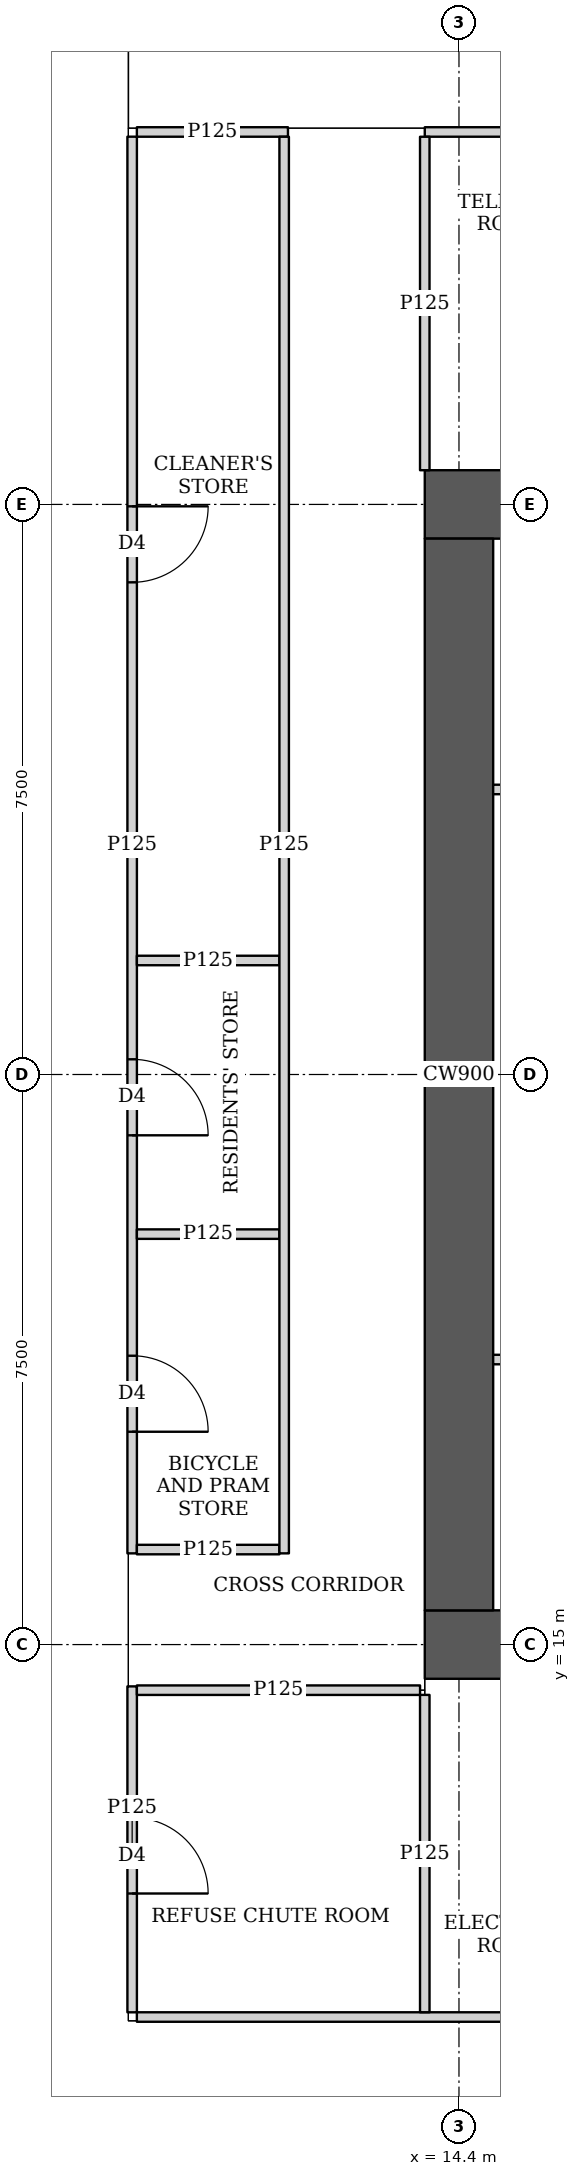
"""IFC4 building model, lengths in metres.
Left out: names, types, materials, properties, quantities, classifications, styles, units other than length and angle.
Written with IfcOpenShell. Run it as: python <this file> out.ifc"""

import sys

from ifc_helpers import new_model, si_unit, direction, frame, frame_2d, origin, place, context, subcontext, project, spatial, rectangle, extrude, element, fill, save


model = new_model("IFC4")
c1 = context("Model", 3, precision=1e-05, world=origin(), true_north=direction((0.0, 1.0)))
c2 = subcontext(c1, "Body", "Model", "MODEL_VIEW")
j1 = project(units=[si_unit("LENGTHUNIT", "METRE"), si_unit("PLANEANGLEUNIT", "RADIAN")], contexts=[c1])
p1 = place(None, origin())
s1 = spatial("IfcSite", under=j1, at=p1, CompositionType="ELEMENT")
p2 = place(p1, origin())
s2 = spatial("IfcBuilding", under=s1, at=p2, CompositionType="ELEMENT")
p3 = place(p2, frame((0.0, 0.0, 147.05)))
s3 = spatial("IfcBuildingStorey", under=s2, at=p3, CompositionType="ELEMENT", Elevation=147.05)
p4 = place(p3, frame((13.95, 15.0, 0.0), z_axis=(0.0, 0.0, 1.0), x_axis=(1.0, 0.0, 0.0)))
e1 = element("IfcWall", 1, at=p4, inside=s3, PredefinedType="SHEAR", context=c2, shape_type="SweptSolid", body=[
    extrude(rectangle(XDim=15.3, YDim=0.9, at=frame_2d((7.65, 0.0))), origin(), (0.0, 0.0, 1.0), 3.75),
])
p5 = place(p4, frame((4.45, 0.0, 0.0)))
e2 = element("IfcOpeningElement", 2, at=p5, cuts=e1, PredefinedType="OPENING", context=c2, shape_type="SweptSolid", body=[
    extrude(rectangle(XDim=1.8, YDim=2.1, at=frame_2d((0.9, 1.05))), frame((0.0, 0.46, 0.0), z_axis=(0.0, -1.0, 0.0), x_axis=(1.0, 0.0, 0.0)), (0.0, 0.0, 1.0), 0.92),
])
p6 = place(p4, frame((10.7, 0.0, 0.0)))
e3 = element("IfcOpeningElement", 3, at=p6, cuts=e1, PredefinedType="OPENING", context=c2, shape_type="SweptSolid", body=[
    extrude(rectangle(XDim=1.1, YDim=2.1, at=frame_2d((0.55, 1.05))), frame((0.0, 0.46, 0.0), z_axis=(0.0, -1.0, 0.0), x_axis=(1.0, 0.0, 0.0)), (0.0, 0.0, 1.0), 0.92),
])
p7 = place(p3, frame((13.95, 30.0, 0.0), z_axis=(0.0, 0.0, 1.0), x_axis=(1.0, 0.0, 0.0)))
e4 = element("IfcWall", 4, at=p7, inside=s3, PredefinedType="SHEAR", context=c2, shape_type="SweptSolid", body=[
    extrude(rectangle(XDim=15.3, YDim=0.9, at=frame_2d((7.65, 0.0))), origin(), (0.0, 0.0, 1.0), 3.75),
])
p8 = place(p7, frame((4.45, 0.0, 0.0)))
e5 = element("IfcOpeningElement", 5, at=p8, cuts=e4, PredefinedType="OPENING", context=c2, shape_type="SweptSolid", body=[
    extrude(rectangle(XDim=1.8, YDim=2.1, at=frame_2d((0.9, 1.05))), frame((0.0, 0.46, 0.0), z_axis=(0.0, -1.0, 0.0), x_axis=(1.0, 0.0, 0.0)), (0.0, 0.0, 1.0), 0.92),
])
p9 = place(p7, frame((10.7, 0.0, 0.0)))
e6 = element("IfcOpeningElement", 6, at=p9, cuts=e4, PredefinedType="OPENING", context=c2, shape_type="SweptSolid", body=[
    extrude(rectangle(XDim=1.1, YDim=2.1, at=frame_2d((0.55, 1.05))), frame((0.0, 0.46, 0.0), z_axis=(0.0, -1.0, 0.0), x_axis=(1.0, 0.0, 0.0)), (0.0, 0.0, 1.0), 0.92),
])
p10 = place(p3, frame((14.4, 15.45, 0.0), z_axis=(0.0, 0.0, 1.0), x_axis=(0.0, 1.0, 0.0)))
e7 = element("IfcWall", 7, at=p10, inside=s3, PredefinedType="SHEAR", context=c2, shape_type="SweptSolid", body=[
    extrude(rectangle(XDim=14.1, YDim=0.9, at=frame_2d((7.05, 0.0))), origin(), (0.0, 0.0, 1.0), 3.75),
])
p11 = place(p3, frame((10.1, 10.162, 0.0), z_axis=(0.0, 0.0, 1.0), x_axis=(0.0, 1.0, 0.0)))
e8 = element("IfcWall", 8, at=p11, inside=s3, PredefinedType="PARTITIONING", context=c2, shape_type="SweptSolid", body=[
    extrude(rectangle(XDim=4.288, YDim=0.125, at=frame_2d((2.144, 0.0))), origin(), (0.0, 0.0, 1.0), 3.5),
])
p12 = place(p11, frame((1.563, 0.0, 0.0)))
e9 = element("IfcOpeningElement", 9, at=p12, cuts=e8, PredefinedType="OPENING", context=c2, shape_type="SweptSolid", body=[
    extrude(rectangle(XDim=1.0, YDim=2.1, at=frame_2d((0.5, 1.05))), frame((0.0, 0.073, 0.0), z_axis=(0.0, -1.0, 0.0), x_axis=(1.0, 0.0, 0.0)), (0.0, 0.0, 1.0), 0.145),
])
p13 = place(p3, frame((10.1, 16.2, 0.0), z_axis=(0.0, 0.0, 1.0), x_axis=(0.0, 1.0, 0.0)))
e10 = element("IfcWall", 10, at=p13, inside=s3, PredefinedType="PARTITIONING", context=c2, shape_type="SweptSolid", body=[
    extrude(rectangle(XDim=18.638, YDim=0.125, at=frame_2d((9.319, 0.0))), origin(), (0.0, 0.0, 1.0), 3.5),
])
p14 = place(p13, frame((1.6, 0.0, 0.0)))
e11 = element("IfcOpeningElement", 11, at=p14, cuts=e10, PredefinedType="OPENING", context=c2, shape_type="SweptSolid", body=[
    extrude(rectangle(XDim=1.0, YDim=2.1, at=frame_2d((0.5, 1.05))), frame((0.0, 0.073, 0.0), z_axis=(0.0, -1.0, 0.0), x_axis=(1.0, 0.0, 0.0)), (0.0, 0.0, 1.0), 0.145),
])
p15 = place(p13, frame((5.5, 0.0, 0.0)))
e12 = element("IfcOpeningElement", 12, at=p15, cuts=e10, PredefinedType="OPENING", context=c2, shape_type="SweptSolid", body=[
    extrude(rectangle(XDim=1.0, YDim=2.1, at=frame_2d((0.5, 1.05))), frame((0.0, 0.073, 0.0), z_axis=(0.0, -1.0, 0.0), x_axis=(1.0, 0.0, 0.0)), (0.0, 0.0, 1.0), 0.145),
])
p16 = place(p13, frame((12.775, 0.0, 0.0)))
e13 = element("IfcOpeningElement", 13, at=p16, cuts=e10, PredefinedType="OPENING", context=c2, shape_type="SweptSolid", body=[
    extrude(rectangle(XDim=1.0, YDim=2.1, at=frame_2d((0.5, 1.05))), frame((0.0, 0.073, 0.0), z_axis=(0.0, -1.0, 0.0), x_axis=(1.0, 0.0, 0.0)), (0.0, 0.0, 1.0), 0.145),
])
p17 = place(p3, frame((10.162, 14.4, 0.0), z_axis=(0.0, 0.0, 1.0), x_axis=(1.0, 0.0, 0.0)))
e14 = element("IfcWall", 14, at=p17, inside=s3, PredefinedType="PARTITIONING", context=c2, shape_type="SweptSolid", body=[
    extrude(rectangle(XDim=3.726, YDim=0.125, at=frame_2d((1.863, 0.0))), origin(), (0.0, 0.0, 1.0), 3.5),
])
for number, where, z_axis, x_axis in (
    (15, (10.162, 20.4, 0.0), (0.0, 0.0, 1.0), (1.0, 0.0, 0.0)),
    (16, (10.162, 24.0, 0.0), (0.0, 0.0, 1.0), (1.0, 0.0, 0.0)),
):
    element("IfcWall", number, at=place(p3, frame(where, z_axis=z_axis, x_axis=x_axis)), inside=s3, PredefinedType="PARTITIONING", context=c2, shape_type="SweptSolid", body=[
        extrude(rectangle(XDim=1.875, YDim=0.125, at=frame_2d((0.938, 0.0))), origin(), (0.0, 0.0, 1.0), 3.5),
    ])
p18 = place(p3, frame((12.1, 16.2, 0.0), z_axis=(0.0, 0.0, 1.0), x_axis=(0.0, 1.0, 0.0)))
e17 = element("IfcWall", 17, at=p18, inside=s3, PredefinedType="PARTITIONING", context=c2, shape_type="SweptSolid", body=[
    extrude(rectangle(XDim=18.637, YDim=0.125, at=frame_2d((9.318, 0.0))), origin(), (0.0, 0.0, 1.0), 3.5),
])
p19 = place(p3, frame((10.162, 16.25, 0.0), z_axis=(0.0, 0.0, 1.0), x_axis=(1.0, 0.0, 0.0)))
e18 = element("IfcWall", 18, at=p19, inside=s3, PredefinedType="PARTITIONING", context=c2, shape_type="SweptSolid", body=[
    extrude(rectangle(XDim=1.875, YDim=0.125, at=frame_2d((0.938, 0.0))), origin(), (0.0, 0.0, 1.0), 3.5),
])
p20 = place(p3, frame((13.95, 10.163, 0.0), z_axis=(0.0, 0.0, 1.0), x_axis=(0.0, 1.0, 0.0)))
e19 = element("IfcWall", 19, at=p20, inside=s3, PredefinedType="PARTITIONING", context=c2, shape_type="SweptSolid", body=[
    extrude(rectangle(XDim=4.175, YDim=0.125, at=frame_2d((2.087, 0.0))), origin(), (0.0, 0.0, 1.0), 3.5),
])
p21 = place(p3, frame((13.95, 30.45, 0.0), z_axis=(0.0, 0.0, 1.0), x_axis=(0.0, 1.0, 0.0)))
e20 = element("IfcWall", 20, at=p21, inside=s3, PredefinedType="PARTITIONING", context=c2, shape_type="SweptSolid", body=[
    extrude(rectangle(XDim=4.387, YDim=0.125, at=frame_2d((2.193, 0.0))), origin(), (0.0, 0.0, 1.0), 3.5),
])
p22 = place(p3, frame((10.162, 10.1, 0.0), z_axis=(0.0, 0.0, 1.0), x_axis=(1.0, 0.0, 0.0)))
e21 = element("IfcWall", 21, at=p22, inside=s3, PredefinedType="PARTITIONING", context=c2, shape_type="SweptSolid", body=[
    extrude(rectangle(XDim=11.288, YDim=0.125, at=frame_2d((5.644, 0.0))), origin(), (0.0, 0.0, 1.0), 3.5),
])
p23 = place(p22, frame((7.833, 0.0, 0.0)))
e22 = element("IfcOpeningElement", 22, at=p23, cuts=e21, PredefinedType="OPENING", context=c2, shape_type="SweptSolid", body=[
    extrude(rectangle(XDim=1.8, YDim=2.1, at=frame_2d((0.9, 1.05))), frame((0.0, 0.073, 0.0), z_axis=(0.0, -1.0, 0.0), x_axis=(1.0, 0.0, 0.0)), (0.0, 0.0, 1.0), 0.145),
])
p24 = place(p3, frame((10.162, 34.9, 0.0), z_axis=(0.0, 0.0, 1.0), x_axis=(1.0, 0.0, 0.0)))
e23 = element("IfcWall", 23, at=p24, inside=s3, PredefinedType="PARTITIONING", context=c2, shape_type="SweptSolid", body=[
    extrude(rectangle(XDim=1.988, YDim=0.125, at=frame_2d((0.994, 0.0))), origin(), (0.0, 0.0, 1.0), 3.5),
])
p25 = place(p3, frame((13.95, 34.9, 0.0), z_axis=(0.0, 0.0, 1.0), x_axis=(1.0, 0.0, 0.0)))
e24 = element("IfcWall", 24, at=p25, inside=s3, PredefinedType="PARTITIONING", context=c2, shape_type="SweptSolid", body=[
    extrude(rectangle(XDim=7.5, YDim=0.125, at=frame_2d((3.75, 0.0))), origin(), (0.0, 0.0, 1.0), 3.5),
])
p26 = place(p25, frame((3.95, 0.0, 0.0)))
e25 = element("IfcOpeningElement", 25, at=p26, cuts=e24, PredefinedType="OPENING", context=c2, shape_type="SweptSolid", body=[
    extrude(rectangle(XDim=1.8, YDim=2.1, at=frame_2d((0.9, 1.05))), frame((0.0, 0.073, 0.0), z_axis=(0.0, -1.0, 0.0), x_axis=(1.0, 0.0, 0.0)), (0.0, 0.0, 1.0), 0.145),
])
for number, where, z_axis, x_axis in (
    (26, (14.85, 18.75, 0.0), (0.0, 0.0, 1.0), (1.0, 0.0, 0.0)),
    (27, (14.85, 26.25, 0.0), (0.0, 0.0, 1.0), (1.0, 0.0, 0.0)),
):
    element("IfcWall", number, at=place(p3, frame(where, z_axis=z_axis, x_axis=x_axis)), inside=s3, PredefinedType="PARTITIONING", context=c2, shape_type="SweptSolid", body=[
        extrude(rectangle(XDim=1.95, YDim=0.125, at=frame_2d((0.975, 0.0))), origin(), (0.0, 0.0, 1.0), 3.5),
    ])
p27 = place(p12, origin())
e28 = element("IfcDoor", 28, at=p27, inside=s3, OperationType="SINGLE_SWING_RIGHT", PredefinedType="DOOR", context=c2, shape_type="SweptSolid", body=[
    extrude(rectangle(XDim=1.0, YDim=2.1, at=frame_2d((0.5, 1.05))), frame((0.0, 0.025, 0.0), z_axis=(0.0, -1.0, 0.0), x_axis=(1.0, 0.0, 0.0)), (0.0, 0.0, 1.0), 0.05),
])
fill(e9, e28)
p28 = place(p14, origin())
e29 = element("IfcDoor", 29, at=p28, inside=s3, OperationType="SINGLE_SWING_RIGHT", PredefinedType="DOOR", context=c2, shape_type="SweptSolid", body=[
    extrude(rectangle(XDim=1.0, YDim=2.1, at=frame_2d((0.5, 1.05))), frame((0.0, 0.025, 0.0), z_axis=(0.0, -1.0, 0.0), x_axis=(1.0, 0.0, 0.0)), (0.0, 0.0, 1.0), 0.05),
])
fill(e11, e29)
p29 = place(p15, origin())
e30 = element("IfcDoor", 30, at=p29, inside=s3, OperationType="SINGLE_SWING_RIGHT", PredefinedType="DOOR", context=c2, shape_type="SweptSolid", body=[
    extrude(rectangle(XDim=1.0, YDim=2.1, at=frame_2d((0.5, 1.05))), frame((0.0, 0.025, 0.0), z_axis=(0.0, -1.0, 0.0), x_axis=(1.0, 0.0, 0.0)), (0.0, 0.0, 1.0), 0.05),
])
fill(e12, e30)
p30 = place(p16, origin())
e31 = element("IfcDoor", 31, at=p30, inside=s3, OperationType="SINGLE_SWING_LEFT", PredefinedType="DOOR", context=c2, shape_type="SweptSolid", body=[
    extrude(rectangle(XDim=1.0, YDim=2.1, at=frame_2d((0.5, 1.05))), frame((0.0, 0.025, 0.0), z_axis=(0.0, -1.0, 0.0), x_axis=(1.0, 0.0, 0.0)), (0.0, 0.0, 1.0), 0.05),
])
fill(e13, e31)
save(model, sys.argv[1])
